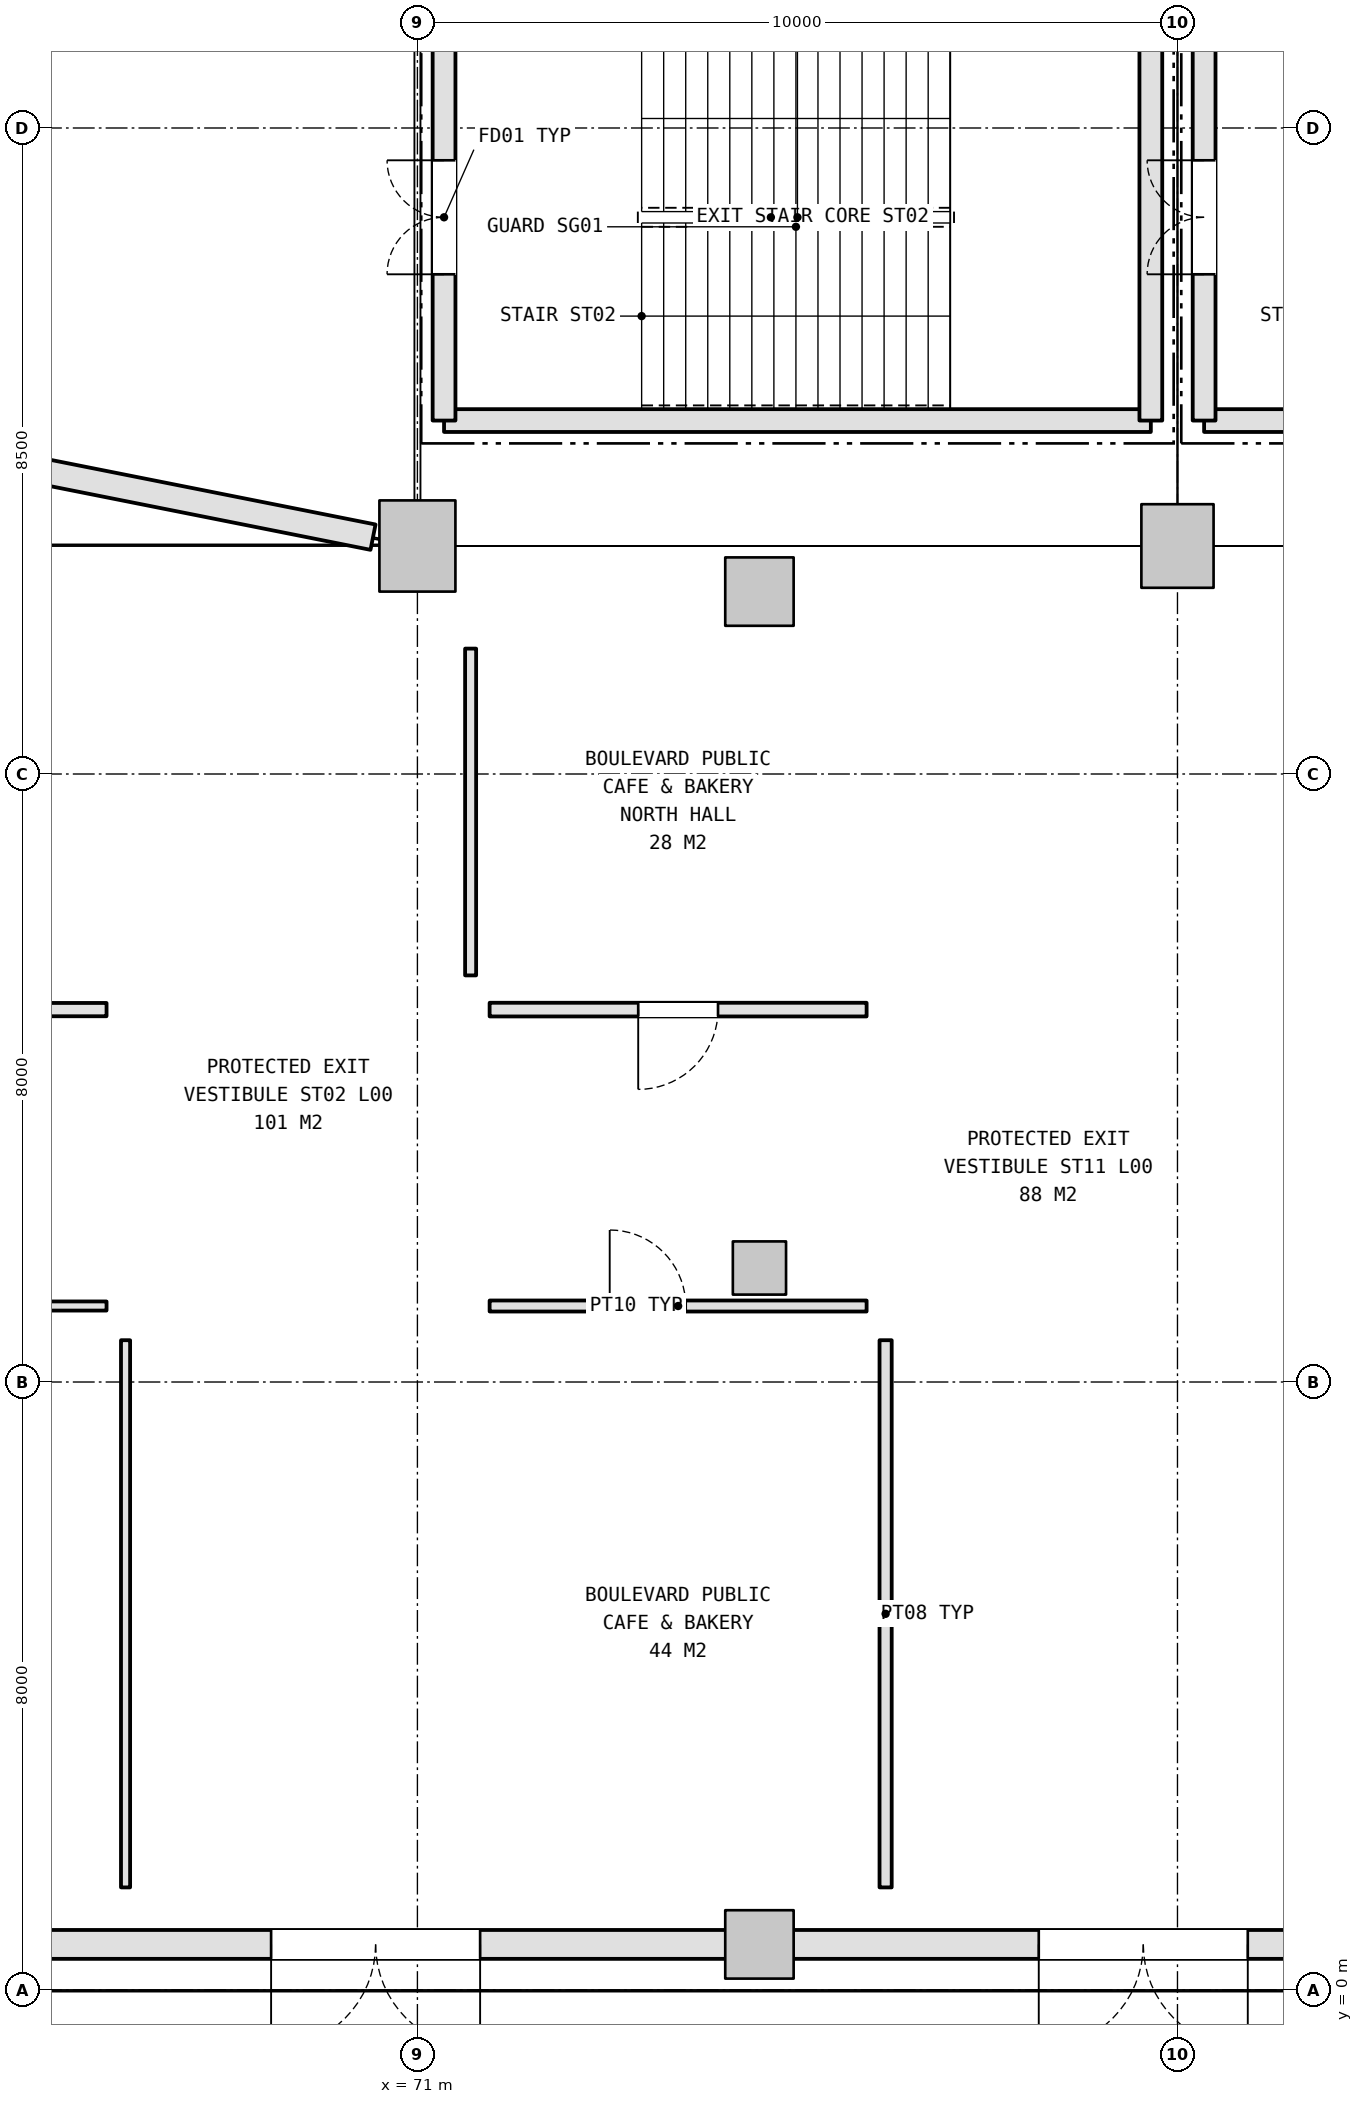
"""IFC4 building model, lengths in metres.
Left out: names, types, materials, properties, quantities, classifications, styles, units other than length and angle.
Written with IfcOpenShell. Run it as: python <this file> out.ifc"""

import sys

from ifc_helpers import new_model, si_unit, direction, frame, frame_2d, origin, origin_2d, place, context, subcontext, project, spatial, rectangle, extrude, element, fill, save


model = new_model("IFC4")
c1 = context("Model", 3, precision=1e-05, world=origin(), true_north=direction((0.0, 1.0)))
c2 = subcontext(c1, "Body", "Model", "MODEL_VIEW")
j1 = project(units=[si_unit("LENGTHUNIT", "METRE"), si_unit("PLANEANGLEUNIT", "RADIAN")], contexts=[c1])
p1 = place(None, origin())
s1 = spatial("IfcSite", under=j1, at=p1, CompositionType="ELEMENT")
p2 = place(p1, origin())
s2 = spatial("IfcBuilding", under=s1, at=p2, CompositionType="ELEMENT")
p3 = place(p2, origin())
s3 = spatial("IfcBuildingStorey", under=s2, at=p3, CompositionType="ELEMENT", Elevation=0.0)
p4 = place(p3, frame((71.0, 19.0, 0.0), z_axis=(0.0, 0.0, 1.0), x_axis=(1.0, 0.0, 0.0)))
e1 = element("IfcColumn", 1, at=p4, inside=s3, PredefinedType="COLUMN", context=c2, shape_type="SweptSolid", body=[
    extrude(rectangle(XDim=1.0, YDim=1.2, at=origin_2d()), origin(), (0.0, 0.0, 1.0), 5.4),
])
p5 = place(p3, frame((81.0, 19.0, 0.0), z_axis=(0.0, 0.0, 1.0), x_axis=(1.0, 0.0, 0.0)))
e2 = element("IfcColumn", 2, at=p5, inside=s3, PredefinedType="COLUMN", context=c2, shape_type="SweptSolid", body=[
    extrude(rectangle(XDim=0.95, YDim=1.1, at=origin_2d()), origin(), (0.0, 0.0, 1.0), 5.4),
])
p6 = place(p3, frame((75.5, 0.6, 0.0), z_axis=(0.0, 0.0, 1.0), x_axis=(1.0, 0.0, 0.0)))
e3 = element("IfcColumn", 3, at=p6, inside=s3, PredefinedType="COLUMN", context=c2, shape_type="SweptSolid", body=[
    extrude(rectangle(XDim=0.9, YDim=0.9, at=origin_2d()), origin(), (0.0, 0.0, 1.0), 5.4),
])
p7 = place(p3, frame((75.5, 9.5, 0.0), z_axis=(0.0, 0.0, 1.0), x_axis=(1.0, 0.0, 0.0)))
e4 = element("IfcColumn", 4, at=p7, inside=s3, PredefinedType="COLUMN", context=c2, shape_type="SweptSolid", body=[
    extrude(rectangle(XDim=0.7, YDim=0.7, at=origin_2d()), origin(), (0.0, 0.0, 1.0), 5.4),
])
p8 = place(p3, frame((75.5, 18.4, 0.0), z_axis=(0.0, 0.0, 1.0), x_axis=(1.0, 0.0, 0.0)))
e5 = element("IfcColumn", 5, at=p8, inside=s3, PredefinedType="COLUMN", context=c2, shape_type="SweptSolid", body=[
    extrude(rectangle(XDim=0.9, YDim=0.9, at=origin_2d()), origin(), (0.0, 0.0, 1.0), 5.4),
])
p9 = place(p3, frame((51.489, 22.881, 0.0), z_axis=(0.0, 0.0, 1.0), x_axis=(0.98078547189, -0.195089359346, 0.0)))
e6 = element("IfcWall", 6, at=p9, inside=s3, PredefinedType="SOLIDWALL", context=c2, shape_type="SweptSolid", body=[
    extrude(rectangle(XDim=19.298, YDim=0.34, at=frame_2d((9.649, 0.0))), origin(), (0.0, 0.0, 1.0), 4.275),
])
p10 = place(p9, frame((8.849, 0.0, 2.4)))
e7 = element("IfcOpeningElement", 7, at=p10, cuts=e6, PredefinedType="OPENING", context=c2, shape_type="SweptSolid", body=[
    extrude(rectangle(XDim=1.6, YDim=1.2, at=frame_2d((0.8, 0.6))), frame((0.0, 0.18, 0.0), z_axis=(0.0, -1.0, 0.0), x_axis=(1.0, 0.0, 0.0)), (0.0, 0.0, 1.0), 0.36),
])
p11 = place(p3, frame((65.838, 0.6, 0.0), z_axis=(0.0, 0.0, 1.0), x_axis=(1.0, 0.0, 0.0)))
e8 = element("IfcWall", 8, at=p11, inside=s3, PredefinedType="SOLIDWALL", context=c2, shape_type="SweptSolid", body=[
    extrude(rectangle(XDim=9.224, YDim=0.38, at=frame_2d((4.612, 0.0))), origin(), (0.0, 0.0, 1.0), 4.425),
])
p12 = place(p11, frame((3.237, 0.0, 0.0)))
e9 = element("IfcOpeningElement", 9, at=p12, cuts=e8, PredefinedType="OPENING", context=c2, shape_type="SweptSolid", body=[
    extrude(rectangle(XDim=2.75, YDim=2.4, at=frame_2d((1.375, 1.2))), frame((0.0, 0.2, 0.0), z_axis=(0.0, -1.0, 0.0), x_axis=(1.0, 0.0, 0.0)), (0.0, 0.0, 1.0), 0.4),
])
p13 = place(p3, frame((75.938, 0.6, 0.0), z_axis=(0.0, 0.0, 1.0), x_axis=(1.0, 0.0, 0.0)))
e10 = element("IfcWall", 10, at=p13, inside=s3, PredefinedType="SOLIDWALL", context=c2, shape_type="SweptSolid", body=[
    extrude(rectangle(XDim=9.224, YDim=0.38, at=frame_2d((4.612, 0.0))), origin(), (0.0, 0.0, 1.0), 4.425),
])
p14 = place(p13, frame((3.237, 0.0, 0.0)))
e11 = element("IfcOpeningElement", 11, at=p14, cuts=e10, PredefinedType="OPENING", context=c2, shape_type="SweptSolid", body=[
    extrude(rectangle(XDim=2.75, YDim=2.4, at=frame_2d((1.375, 1.2))), frame((0.0, 0.2, 0.0), z_axis=(0.0, -1.0, 0.0), x_axis=(1.0, 0.0, 0.0)), (0.0, 0.0, 1.0), 0.4),
])
p15 = place(p3, frame((71.35, 20.65, 0.0), z_axis=(0.0, 0.0, 1.0), x_axis=(1.0, 0.0, 0.0)))
e12 = element("IfcWall", 12, at=p15, inside=s3, PredefinedType="SHEAR", context=c2, shape_type="SweptSolid", body=[
    extrude(rectangle(XDim=9.299, YDim=0.3, at=frame_2d((4.65, 0.0))), origin(), (0.0, 0.0, 1.0), 5.14),
])
p16 = place(p3, frame((80.65, 20.65, 0.0), z_axis=(0.0, 0.0, 1.0), x_axis=(0.0, 1.0, 0.0)))
e13 = element("IfcWall", 13, at=p16, inside=s3, PredefinedType="SHEAR", context=c2, shape_type="SweptSolid", body=[
    extrude(rectangle(XDim=5.349, YDim=0.3, at=frame_2d((2.675, 0.0))), origin(), (0.0, 0.0, 1.0), 5.14),
])
p17 = place(p3, frame((71.35, 26.0, 0.0), z_axis=(0.0, 0.0, 1.0), x_axis=(0.0, -1.0, 0.0)))
e14 = element("IfcWall", 14, at=p17, inside=s3, PredefinedType="SHEAR", context=c2, shape_type="SweptSolid", body=[
    extrude(rectangle(XDim=5.349, YDim=0.3, at=frame_2d((2.675, 0.0))), origin(), (0.0, 0.0, 1.0), 5.14),
])
p18 = place(p17, frame((1.925, 0.0, 0.0)))
e15 = element("IfcOpeningElement", 15, at=p18, cuts=e14, PredefinedType="OPENING", context=c2, shape_type="SweptSolid", body=[
    extrude(rectangle(XDim=1.5, YDim=2.2, at=frame_2d((0.75, 1.1))), frame((0.0, 0.16, 0.0), z_axis=(0.0, -1.0, 0.0), x_axis=(1.0, 0.0, 0.0)), (0.0, 0.0, 1.0), 0.32),
])
p19 = place(p3, frame((81.35, 20.65, 0.0), z_axis=(0.0, 0.0, 1.0), x_axis=(1.0, 0.0, 0.0)))
e16 = element("IfcWall", 16, at=p19, inside=s3, PredefinedType="SHEAR", context=c2, shape_type="SweptSolid", body=[
    extrude(rectangle(XDim=9.299, YDim=0.3, at=frame_2d((4.65, 0.0))), origin(), (0.0, 0.0, 1.0), 5.14),
])
p20 = place(p3, frame((81.35, 26.0, 0.0), z_axis=(0.0, 0.0, 1.0), x_axis=(0.0, -1.0, 0.0)))
e17 = element("IfcWall", 17, at=p20, inside=s3, PredefinedType="SHEAR", context=c2, shape_type="SweptSolid", body=[
    extrude(rectangle(XDim=5.349, YDim=0.3, at=frame_2d((2.675, 0.0))), origin(), (0.0, 0.0, 1.0), 5.14),
])
p21 = place(p20, frame((1.925, 0.0, 0.0)))
e18 = element("IfcOpeningElement", 18, at=p21, cuts=e17, PredefinedType="OPENING", context=c2, shape_type="SweptSolid", body=[
    extrude(rectangle(XDim=1.5, YDim=2.2, at=frame_2d((0.75, 1.1))), frame((0.0, 0.16, 0.0), z_axis=(0.0, -1.0, 0.0), x_axis=(1.0, 0.0, 0.0)), (0.0, 0.0, 1.0), 0.32),
])
p22 = place(p3, frame((49.95, 9.0, 0.0), z_axis=(0.0, 0.0, 1.0), x_axis=(1.0, 0.0, 0.0)))
e19 = element("IfcWall", 19, at=p22, inside=s3, PredefinedType="PARTITIONING", context=c2, shape_type="SweptSolid", body=[
    extrude(rectangle(XDim=16.96, YDim=0.12, at=frame_2d((8.48, 0.0))), origin(), (0.0, 0.0, 1.0), 4.425),
])
p23 = place(p22, frame((7.92, 0.0, 0.0)))
e20 = element("IfcOpeningElement", 20, at=p23, cuts=e19, PredefinedType="OPENING", context=c2, shape_type="SweptSolid", body=[
    extrude(rectangle(XDim=1.12, YDim=2.2, at=frame_2d((0.56, 1.1))), frame((0.0, 0.07, 0.0), z_axis=(0.0, -1.0, 0.0), x_axis=(1.0, 0.0, 0.0)), (0.0, 0.0, 1.0), 0.14),
])
p24 = place(p3, frame((67.16, 8.55, 0.0), z_axis=(0.0, 0.0, 1.0), x_axis=(0.0, -1.0, 0.0)))
e21 = element("IfcWall", 21, at=p24, inside=s3, PredefinedType="PARTITIONING", context=c2, shape_type="SweptSolid", body=[
    extrude(rectangle(XDim=7.2, YDim=0.12, at=frame_2d((3.6, 0.0))), origin(), (0.0, 0.0, 1.0), 5.12),
])
p25 = place(p3, frame((66.91, 12.9, 0.0), z_axis=(0.0, 0.0, 1.0), x_axis=(-1.0, 0.0, 0.0)))
e22 = element("IfcWall", 22, at=p25, inside=s3, PredefinedType="PARTITIONING", context=c2, shape_type="SweptSolid", body=[
    extrude(rectangle(XDim=16.96, YDim=0.175, at=frame_2d((8.48, 0.0))), origin(), (0.0, 0.0, 1.0), 4.425),
])
p26 = place(p25, frame((7.68, 0.0, 0.0)))
e23 = element("IfcOpeningElement", 23, at=p26, cuts=e22, PredefinedType="OPENING", context=c2, shape_type="SweptSolid", body=[
    extrude(rectangle(XDim=1.6, YDim=2.2, at=frame_2d((0.8, 1.1))), frame((0.0, 0.097, 0.0), z_axis=(0.0, -1.0, 0.0), x_axis=(1.0, 0.0, 0.0)), (0.0, 0.0, 1.0), 0.195),
])
p27 = place(p3, frame((71.95, 9.0, 0.0), z_axis=(0.0, 0.0, 1.0), x_axis=(1.0, 0.0, 0.0)))
e24 = element("IfcWall", 24, at=p27, inside=s3, PredefinedType="PARTITIONING", context=c2, shape_type="SweptSolid", body=[
    extrude(rectangle(XDim=4.96, YDim=0.145, at=frame_2d((2.48, 0.0))), origin(), (0.0, 0.0, 1.0), 4.425),
])
p28 = place(p27, frame((1.58, 0.0, 0.0)))
e25 = element("IfcOpeningElement", 25, at=p28, cuts=e24, PredefinedType="OPENING", context=c2, shape_type="SweptSolid", body=[
    extrude(rectangle(XDim=1.0, YDim=2.1, at=frame_2d((0.5, 1.05))), frame((0.0, 0.083, 0.0), z_axis=(0.0, -1.0, 0.0), x_axis=(1.0, 0.0, 0.0)), (0.0, 0.0, 1.0), 0.165),
])
p29 = place(p3, frame((77.16, 8.55, 0.0), z_axis=(0.0, 0.0, 1.0), x_axis=(0.0, -1.0, 0.0)))
e26 = element("IfcWall", 26, at=p29, inside=s3, PredefinedType="PARTITIONING", context=c2, shape_type="SweptSolid", body=[
    extrude(rectangle(XDim=7.2, YDim=0.16, at=frame_2d((3.6, 0.0))), origin(), (0.0, 0.0, 1.0), 4.625),
])
p30 = place(p3, frame((76.91, 12.9, 0.0), z_axis=(0.0, 0.0, 1.0), x_axis=(-1.0, 0.0, 0.0)))
e27 = element("IfcWall", 27, at=p30, inside=s3, PredefinedType="PARTITIONING", context=c2, shape_type="SweptSolid", body=[
    extrude(rectangle(XDim=4.96, YDim=0.18, at=frame_2d((2.48, 0.0))), origin(), (0.0, 0.0, 1.0), 4.425),
])
p31 = place(p30, frame((1.955, 0.0, 0.0)))
e28 = element("IfcOpeningElement", 28, at=p31, cuts=e27, PredefinedType="OPENING", context=c2, shape_type="SweptSolid", body=[
    extrude(rectangle(XDim=1.05, YDim=2.2, at=frame_2d((0.525, 1.1))), frame((0.0, 0.1, 0.0), z_axis=(0.0, -1.0, 0.0), x_axis=(1.0, 0.0, 0.0)), (0.0, 0.0, 1.0), 0.2),
])
p32 = place(p3, frame((71.7, 13.35, 0.0), z_axis=(0.0, 0.0, 1.0), x_axis=(0.0, 1.0, 0.0)))
e29 = element("IfcWall", 29, at=p32, inside=s3, PredefinedType="PARTITIONING", context=c2, shape_type="SweptSolid", body=[
    extrude(rectangle(XDim=4.3, YDim=0.145, at=frame_2d((2.15, 0.0))), origin(), (0.0, 0.0, 1.0), 4.625),
])
p33 = place(p12, frame((2.75, 0.0, 0.0), z_axis=(0.0, 0.0, 1.0), x_axis=(-1.0, 0.0, 0.0)))
e30 = element("IfcDoor", 30, at=p33, inside=s3, OperationType="DOUBLE_DOOR_SINGLE_SWING", PredefinedType="DOOR", context=c2, shape_type="SweptSolid", body=[
    extrude(rectangle(XDim=2.75, YDim=2.4, at=frame_2d((1.375, 1.2))), frame((0.0, 0.025, 0.0), z_axis=(0.0, -1.0, 0.0), x_axis=(1.0, 0.0, 0.0)), (0.0, 0.0, 1.0), 0.05),
])
fill(e9, e30)
p34 = place(p14, frame((2.75, 0.0, 0.0), z_axis=(0.0, 0.0, 1.0), x_axis=(-1.0, 0.0, 0.0)))
e31 = element("IfcDoor", 31, at=p34, inside=s3, OperationType="DOUBLE_DOOR_SINGLE_SWING", PredefinedType="DOOR", context=c2, shape_type="SweptSolid", body=[
    extrude(rectangle(XDim=2.75, YDim=2.4, at=frame_2d((1.375, 1.2))), frame((0.0, 0.025, 0.0), z_axis=(0.0, -1.0, 0.0), x_axis=(1.0, 0.0, 0.0)), (0.0, 0.0, 1.0), 0.05),
])
fill(e11, e31)
p35 = place(p18, frame((1.5, 0.0, 0.0), z_axis=(0.0, 0.0, 1.0), x_axis=(-1.0, 0.0, 0.0)))
e32 = element("IfcDoor", 32, at=p35, inside=s3, OperationType="DOUBLE_DOOR_SINGLE_SWING", PredefinedType="DOOR", context=c2, shape_type="SweptSolid", body=[
    extrude(rectangle(XDim=1.5, YDim=2.2, at=frame_2d((0.75, 1.1))), frame((0.0, 0.025, 0.0), z_axis=(0.0, -1.0, 0.0), x_axis=(1.0, 0.0, 0.0)), (0.0, 0.0, 1.0), 0.05),
])
fill(e15, e32)
p36 = place(p21, frame((1.5, 0.0, 0.0), z_axis=(0.0, 0.0, 1.0), x_axis=(-1.0, 0.0, 0.0)))
e33 = element("IfcDoor", 33, at=p36, inside=s3, OperationType="DOUBLE_DOOR_SINGLE_SWING", PredefinedType="DOOR", context=c2, shape_type="SweptSolid", body=[
    extrude(rectangle(XDim=1.5, YDim=2.2, at=frame_2d((0.75, 1.1))), frame((0.0, 0.025, 0.0), z_axis=(0.0, -1.0, 0.0), x_axis=(1.0, 0.0, 0.0)), (0.0, 0.0, 1.0), 0.05),
])
fill(e18, e33)
p37 = place(p28, origin())
e34 = element("IfcDoor", 34, at=p37, inside=s3, OperationType="SINGLE_SWING_LEFT", PredefinedType="DOOR", context=c2, shape_type="SweptSolid", body=[
    extrude(rectangle(XDim=1.0, YDim=2.1, at=frame_2d((0.5, 1.05))), frame((0.0, 0.025, 0.0), z_axis=(0.0, -1.0, 0.0), x_axis=(1.0, 0.0, 0.0)), (0.0, 0.0, 1.0), 0.05),
])
fill(e25, e34)
p38 = place(p31, origin())
e35 = element("IfcDoor", 35, at=p38, inside=s3, OperationType="SINGLE_SWING_RIGHT", PredefinedType="DOOR", context=c2, shape_type="SweptSolid", body=[
    extrude(rectangle(XDim=1.05, YDim=2.2, at=frame_2d((0.525, 1.1))), frame((0.0, 0.025, 0.0), z_axis=(0.0, -1.0, 0.0), x_axis=(1.0, 0.0, 0.0)), (0.0, 0.0, 1.0), 0.05),
])
fill(e28, e35)
save(model, sys.argv[1])
